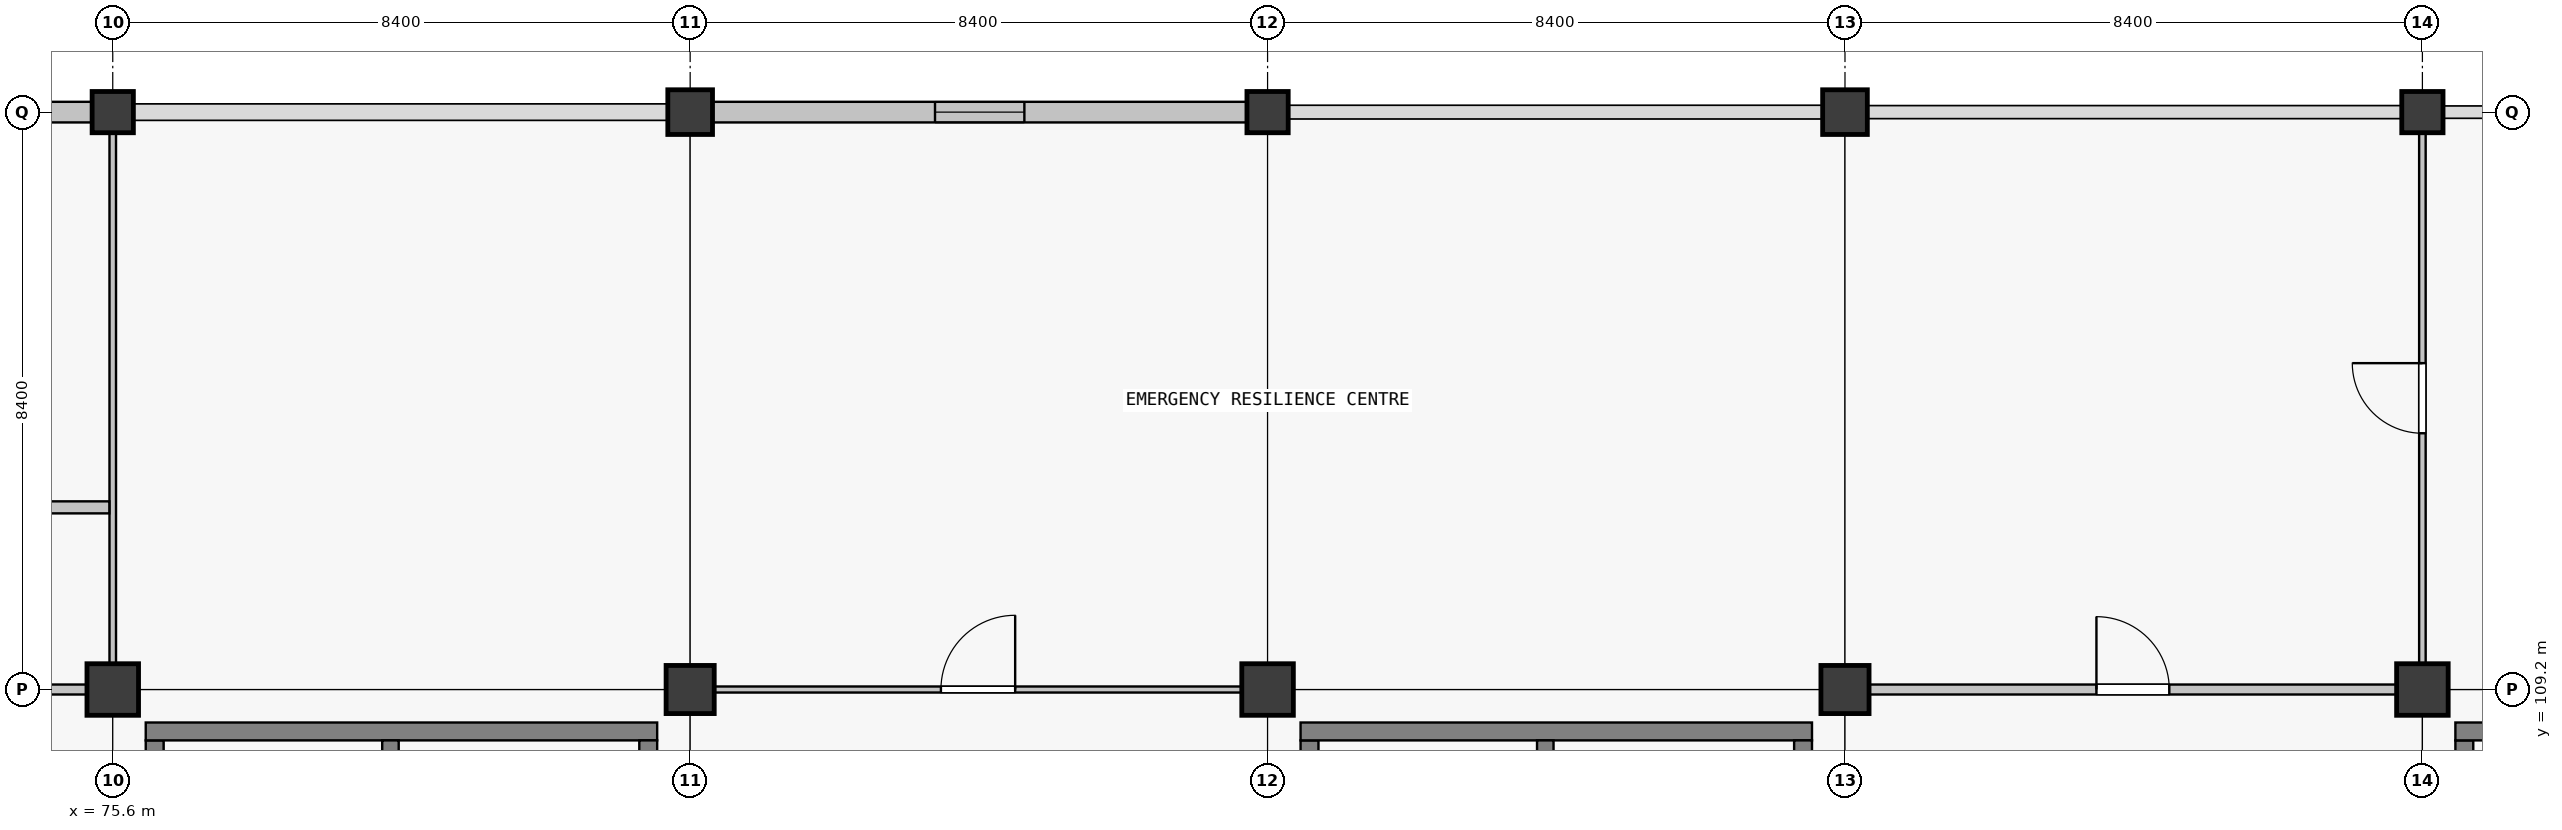
"""IFC4 building model, lengths in metres.
Left out: names, types, materials, properties, quantities, classifications, styles, units other than length and angle.
Written with IfcOpenShell. Run it as: python <this file> out.ifc"""

import sys

from ifc_helpers import new_model, si_unit, direction, frame, frame_2d, origin, origin_2d, place, context, subcontext, project, spatial, rectangle, extrude, element, fill, save


model = new_model("IFC4")
c1 = context("Model", 3, precision=1e-05, world=origin(), true_north=direction((0.0, 1.0)))
c2 = subcontext(c1, "Body", "Model", "MODEL_VIEW")
j1 = project(units=[si_unit("LENGTHUNIT", "METRE"), si_unit("PLANEANGLEUNIT", "RADIAN")], contexts=[c1])
p1 = place(None, origin())
s1 = spatial("IfcSite", under=j1, at=p1, CompositionType="ELEMENT")
p2 = place(p1, origin())
s2 = spatial("IfcBuilding", under=s1, at=p2, CompositionType="ELEMENT")
p3 = place(p2, frame((0.0, 0.0, 19.08)))
s3 = spatial("IfcBuildingStorey", under=s2, at=p3, CompositionType="ELEMENT", Elevation=19.08)
p4 = place(p3, frame((75.6, 109.2, 0.0), z_axis=(0.0, 0.0, 1.0), x_axis=(1.0, 0.0, 0.0)))
e1 = element("IfcColumn", 1, at=p4, inside=s3, PredefinedType="COLUMN", context=c2, shape_type="SweptSolid", body=[
    extrude(rectangle(XDim=0.75, YDim=0.75, at=origin_2d()), origin(), (0.0, 0.0, 1.0), 4.32),
])
p5 = place(p3, frame((75.6, 117.6, 0.0), z_axis=(0.0, 0.0, 1.0), x_axis=(1.0, 0.0, 0.0)))
e2 = element("IfcColumn", 2, at=p5, inside=s3, PredefinedType="COLUMN", context=c2, shape_type="SweptSolid", body=[
    extrude(rectangle(XDim=0.6, YDim=0.6, at=origin_2d()), origin(), (0.0, 0.0, 1.0), 4.32),
])
p6 = place(p3, frame((84.0, 109.2, 0.0), z_axis=(0.0, 0.0, 1.0), x_axis=(1.0, 0.0, 0.0)))
e3 = element("IfcColumn", 3, at=p6, inside=s3, PredefinedType="COLUMN", context=c2, shape_type="SweptSolid", body=[
    extrude(rectangle(XDim=0.7, YDim=0.7, at=origin_2d()), origin(), (0.0, 0.0, 1.0), 4.32),
])
p7 = place(p3, frame((84.0, 117.6, 0.0), z_axis=(0.0, 0.0, 1.0), x_axis=(1.0, 0.0, 0.0)))
e4 = element("IfcColumn", 4, at=p7, inside=s3, PredefinedType="COLUMN", context=c2, shape_type="SweptSolid", body=[
    extrude(rectangle(XDim=0.65, YDim=0.65, at=origin_2d()), origin(), (0.0, 0.0, 1.0), 4.32),
])
p8 = place(p3, frame((92.4, 109.2, 0.0), z_axis=(0.0, 0.0, 1.0), x_axis=(1.0, 0.0, 0.0)))
e5 = element("IfcColumn", 5, at=p8, inside=s3, PredefinedType="COLUMN", context=c2, shape_type="SweptSolid", body=[
    extrude(rectangle(XDim=0.75, YDim=0.75, at=origin_2d()), origin(), (0.0, 0.0, 1.0), 4.32),
])
p9 = place(p3, frame((92.4, 117.6, 0.0), z_axis=(0.0, 0.0, 1.0), x_axis=(1.0, 0.0, 0.0)))
e6 = element("IfcColumn", 6, at=p9, inside=s3, PredefinedType="COLUMN", context=c2, shape_type="SweptSolid", body=[
    extrude(rectangle(XDim=0.6, YDim=0.6, at=origin_2d()), origin(), (0.0, 0.0, 1.0), 4.32),
])
p10 = place(p3, frame((100.8, 109.2, 0.0), z_axis=(0.0, 0.0, 1.0), x_axis=(1.0, 0.0, 0.0)))
e7 = element("IfcColumn", 7, at=p10, inside=s3, PredefinedType="COLUMN", context=c2, shape_type="SweptSolid", body=[
    extrude(rectangle(XDim=0.7, YDim=0.7, at=origin_2d()), origin(), (0.0, 0.0, 1.0), 4.32),
])
p11 = place(p3, frame((100.8, 117.6, 0.0), z_axis=(0.0, 0.0, 1.0), x_axis=(1.0, 0.0, 0.0)))
e8 = element("IfcColumn", 8, at=p11, inside=s3, PredefinedType="COLUMN", context=c2, shape_type="SweptSolid", body=[
    extrude(rectangle(XDim=0.65, YDim=0.65, at=origin_2d()), origin(), (0.0, 0.0, 1.0), 4.32),
])
p12 = place(p3, frame((109.2, 109.2, 0.0), z_axis=(0.0, 0.0, 1.0), x_axis=(1.0, 0.0, 0.0)))
e9 = element("IfcColumn", 9, at=p12, inside=s3, PredefinedType="COLUMN", context=c2, shape_type="SweptSolid", body=[
    extrude(rectangle(XDim=0.75, YDim=0.75, at=origin_2d()), origin(), (0.0, 0.0, 1.0), 4.32),
])
p13 = place(p3, frame((109.2, 117.6, 0.0), z_axis=(0.0, 0.0, 1.0), x_axis=(1.0, 0.0, 0.0)))
e10 = element("IfcColumn", 10, at=p13, inside=s3, PredefinedType="COLUMN", context=c2, shape_type="SweptSolid", body=[
    extrude(rectangle(XDim=0.6, YDim=0.6, at=origin_2d()), origin(), (0.0, 0.0, 1.0), 4.32),
])
p14 = place(p3, frame((67.526, 117.6, 0.0), z_axis=(0.0, 0.0, 1.0), x_axis=(1.0, 0.0, 0.0)))
e11 = element("IfcWall", 11, at=p14, inside=s3, PredefinedType="SOLIDWALL", context=c2, shape_type="SweptSolid", body=[
    extrude(rectangle(XDim=7.773, YDim=0.3, at=frame_2d((3.887, 0.0))), origin(), (0.0, 0.0, 1.0), 3.37),
])
p15 = place(p14, frame((2.811, 0.0, 0.9)))
e12 = element("IfcOpeningElement", 12, at=p15, cuts=e11, PredefinedType="OPENING", context=c2, shape_type="SweptSolid", body=[
    extrude(rectangle(XDim=2.15, YDim=1.95, at=frame_2d((1.075, 0.975))), frame((0.0, 0.15, 0.0), z_axis=(0.0, -1.0, 0.0), x_axis=(1.0, 0.0, 0.0)), (0.0, 0.0, 1.0), 0.3),
])
p16 = place(p3, frame((84.326, 117.6, 0.0), z_axis=(0.0, 0.0, 1.0), x_axis=(1.0, 0.0, 0.0)))
e13 = element("IfcWall", 13, at=p16, inside=s3, PredefinedType="SOLIDWALL", context=c2, shape_type="SweptSolid", body=[
    extrude(rectangle(XDim=7.773, YDim=0.3, at=frame_2d((3.887, 0.0))), origin(), (0.0, 0.0, 1.0), 3.37),
])
p17 = place(p16, frame((3.236, 0.0, 0.9)))
e14 = element("IfcOpeningElement", 14, at=p17, cuts=e13, PredefinedType="OPENING", context=c2, shape_type="SweptSolid", body=[
    extrude(rectangle(XDim=1.3, YDim=1.95, at=frame_2d((0.65, 0.975))), frame((0.0, 0.15, 0.0), z_axis=(0.0, -1.0, 0.0), x_axis=(1.0, 0.0, 0.0)), (0.0, 0.0, 1.0), 0.3),
])
p18 = place(p3, frame((109.81, 101.54, 0.0), z_axis=(0.0, 0.0, 1.0), x_axis=(0.0, 1.0, 0.0)))
e15 = element("IfcWall", 15, at=p18, inside=s3, PredefinedType="SHEAR", context=c2, shape_type="SweptSolid", body=[
    extrude(rectangle(XDim=6.92, YDim=0.26, at=frame_2d((3.46, 0.0))), origin(), (0.0, 0.0, 1.0), 4.32),
])
p19 = place(p3, frame((109.68, 108.59, 0.0), z_axis=(0.0, 0.0, 1.0), x_axis=(1.0, 0.0, 0.0)))
e16 = element("IfcWall", 16, at=p19, inside=s3, PredefinedType="SHEAR", context=c2, shape_type="SweptSolid", body=[
    extrude(rectangle(XDim=7.44, YDim=0.26, at=frame_2d((3.72, 0.0))), origin(), (0.0, 0.0, 1.0), 4.32),
])
p20 = place(p3, frame((76.21, 101.54, 0.0), z_axis=(0.0, 0.0, 1.0), x_axis=(0.0, 1.0, 0.0)))
e17 = element("IfcWall", 17, at=p20, inside=s3, PredefinedType="SHEAR", context=c2, shape_type="SweptSolid", body=[
    extrude(rectangle(XDim=6.92, YDim=0.26, at=frame_2d((3.46, 0.0))), origin(), (0.0, 0.0, 1.0), 4.32),
])
p21 = place(p3, frame((76.08, 108.59, 0.0), z_axis=(0.0, 0.0, 1.0), x_axis=(1.0, 0.0, 0.0)))
e18 = element("IfcWall", 18, at=p21, inside=s3, PredefinedType="SHEAR", context=c2, shape_type="SweptSolid", body=[
    extrude(rectangle(XDim=7.44, YDim=0.26, at=frame_2d((3.72, 0.0))), origin(), (0.0, 0.0, 1.0), 4.32),
])
p22 = place(p3, frame((83.39, 108.46, 0.0), z_axis=(0.0, 0.0, 1.0), x_axis=(0.0, -1.0, 0.0)))
e19 = element("IfcWall", 19, at=p22, inside=s3, PredefinedType="SHEAR", context=c2, shape_type="SweptSolid", body=[
    extrude(rectangle(XDim=6.92, YDim=0.26, at=frame_2d((3.46, 0.0))), origin(), (0.0, 0.0, 1.0), 4.32),
])
p23 = place(p22, frame((4.01, 0.0, 0.0)))
e20 = element("IfcOpeningElement", 20, at=p23, cuts=e19, PredefinedType="OPENING", context=c2, shape_type="SweptSolid", body=[
    extrude(rectangle(XDim=1.5, YDim=2.15, at=frame_2d((0.75, 1.075))), frame((0.0, 0.13, 0.0), z_axis=(0.0, -1.0, 0.0), x_axis=(1.0, 0.0, 0.0)), (0.0, 0.0, 1.0), 0.26),
])
p24 = place(p3, frame((79.64, 101.54, 0.0), z_axis=(0.0, 0.0, 1.0), x_axis=(0.0, 1.0, 0.0)))
e21 = element("IfcWall", 21, at=p24, inside=s3, PredefinedType="SHEAR", context=c2, shape_type="SweptSolid", body=[
    extrude(rectangle(XDim=6.92, YDim=0.24, at=frame_2d((3.46, 0.0))), origin(), (0.0, 0.0, 1.0), 4.32),
])
p25 = place(p24, frame((0.12, 0.0, 0.0)))
e22 = element("IfcOpeningElement", 22, at=p25, cuts=e21, PredefinedType="OPENING", context=c2, shape_type="SweptSolid", body=[
    extrude(rectangle(XDim=1.0, YDim=2.15, at=frame_2d((0.5, 1.075))), frame((0.0, 0.12, 0.0), z_axis=(0.0, -1.0, 0.0), x_axis=(1.0, 0.0, 0.0)), (0.0, 0.0, 1.0), 0.24),
])
p26 = place(p3, frame((93.01, 101.54, 0.0), z_axis=(0.0, 0.0, 1.0), x_axis=(0.0, 1.0, 0.0)))
e23 = element("IfcWall", 23, at=p26, inside=s3, PredefinedType="SHEAR", context=c2, shape_type="SweptSolid", body=[
    extrude(rectangle(XDim=6.92, YDim=0.26, at=frame_2d((3.46, 0.0))), origin(), (0.0, 0.0, 1.0), 4.32),
])
p27 = place(p3, frame((92.88, 108.59, 0.0), z_axis=(0.0, 0.0, 1.0), x_axis=(1.0, 0.0, 0.0)))
e24 = element("IfcWall", 24, at=p27, inside=s3, PredefinedType="SHEAR", context=c2, shape_type="SweptSolid", body=[
    extrude(rectangle(XDim=7.44, YDim=0.26, at=frame_2d((3.72, 0.0))), origin(), (0.0, 0.0, 1.0), 4.32),
])
p28 = place(p3, frame((100.19, 108.46, 0.0), z_axis=(0.0, 0.0, 1.0), x_axis=(0.0, -1.0, 0.0)))
e25 = element("IfcWall", 25, at=p28, inside=s3, PredefinedType="SHEAR", context=c2, shape_type="SweptSolid", body=[
    extrude(rectangle(XDim=6.92, YDim=0.26, at=frame_2d((3.46, 0.0))), origin(), (0.0, 0.0, 1.0), 4.32),
])
p29 = place(p28, frame((4.01, 0.0, 0.0)))
e26 = element("IfcOpeningElement", 26, at=p29, cuts=e25, PredefinedType="OPENING", context=c2, shape_type="SweptSolid", body=[
    extrude(rectangle(XDim=1.5, YDim=2.15, at=frame_2d((0.75, 1.075))), frame((0.0, 0.13, 0.0), z_axis=(0.0, -1.0, 0.0), x_axis=(1.0, 0.0, 0.0)), (0.0, 0.0, 1.0), 0.26),
])
p30 = place(p3, frame((96.44, 101.54, 0.0), z_axis=(0.0, 0.0, 1.0), x_axis=(0.0, 1.0, 0.0)))
e27 = element("IfcWall", 27, at=p30, inside=s3, PredefinedType="SHEAR", context=c2, shape_type="SweptSolid", body=[
    extrude(rectangle(XDim=6.92, YDim=0.24, at=frame_2d((3.46, 0.0))), origin(), (0.0, 0.0, 1.0), 4.32),
])
p31 = place(p30, frame((0.12, 0.0, 0.0)))
e28 = element("IfcOpeningElement", 28, at=p31, cuts=e27, PredefinedType="OPENING", context=c2, shape_type="SweptSolid", body=[
    extrude(rectangle(XDim=1.0, YDim=2.15, at=frame_2d((0.5, 1.075))), frame((0.0, 0.12, 0.0), z_axis=(0.0, -1.0, 0.0), x_axis=(1.0, 0.0, 0.0)), (0.0, 0.0, 1.0), 0.24),
])
p32 = place(p3, frame((67.552, 109.2, 0.0), z_axis=(0.0, 0.0, 1.0), x_axis=(1.0, 0.0, 0.0)))
e29 = element("IfcWall", 29, at=p32, inside=s3, PredefinedType="PARTITIONING", context=c2, shape_type="SweptSolid", body=[
    extrude(rectangle(XDim=7.671, YDim=0.145, at=frame_2d((3.835, 0.0))), origin(), (0.0, 0.0, 1.0), 3.19),
])
p33 = place(p3, frame((84.352, 109.2, 0.0), z_axis=(0.0, 0.0, 1.0), x_axis=(1.0, 0.0, 0.0)))
e30 = element("IfcWall", 30, at=p33, inside=s3, PredefinedType="PARTITIONING", context=c2, shape_type="SweptSolid", body=[
    extrude(rectangle(XDim=7.671, YDim=0.088, at=frame_2d((3.835, 0.0))), origin(), (0.0, 0.0, 1.0), 3.19),
])
p34 = place(p33, frame((3.296, 0.0, 0.0)))
e31 = element("IfcOpeningElement", 31, at=p34, cuts=e30, PredefinedType="OPENING", context=c2, shape_type="SweptSolid", body=[
    extrude(rectangle(XDim=1.08, YDim=2.25, at=frame_2d((0.54, 1.125))), frame((0.0, 0.044, 0.0), z_axis=(0.0, -1.0, 0.0), x_axis=(1.0, 0.0, 0.0)), (0.0, 0.0, 1.0), 0.088),
])
p35 = place(p3, frame((101.152, 109.2, 0.0), z_axis=(0.0, 0.0, 1.0), x_axis=(1.0, 0.0, 0.0)))
e32 = element("IfcWall", 32, at=p35, inside=s3, PredefinedType="PARTITIONING", context=c2, shape_type="SweptSolid", body=[
    extrude(rectangle(XDim=7.671, YDim=0.145, at=frame_2d((3.835, 0.0))), origin(), (0.0, 0.0, 1.0), 3.19),
])
p36 = place(p35, frame((3.306, 0.0, 0.0)))
e33 = element("IfcOpeningElement", 33, at=p36, cuts=e32, PredefinedType="OPENING", context=c2, shape_type="SweptSolid", body=[
    extrude(rectangle(XDim=1.06, YDim=2.25, at=frame_2d((0.53, 1.125))), frame((0.0, 0.073, 0.0), z_axis=(0.0, -1.0, 0.0), x_axis=(1.0, 0.0, 0.0)), (0.0, 0.0, 1.0), 0.145),
])
p37 = place(p3, frame((75.6, 109.577, 0.0), z_axis=(0.0, 0.0, 1.0), x_axis=(0.0, 1.0, 0.0)))
e34 = element("IfcWall", 34, at=p37, inside=s3, PredefinedType="PARTITIONING", context=c2, shape_type="SweptSolid", body=[
    extrude(rectangle(XDim=7.721, YDim=0.095, at=frame_2d((3.861, 0.0))), origin(), (0.0, 0.0, 1.0), 3.19),
])
p38 = place(p3, frame((109.2, 109.577, 0.0), z_axis=(0.0, 0.0, 1.0), x_axis=(0.0, 1.0, 0.0)))
e35 = element("IfcWall", 35, at=p38, inside=s3, PredefinedType="PARTITIONING", context=c2, shape_type="SweptSolid", body=[
    extrude(rectangle(XDim=7.721, YDim=0.095, at=frame_2d((3.861, 0.0))), origin(), (0.0, 0.0, 1.0), 3.19),
])
p39 = place(p38, frame((3.351, 0.0, 0.0)))
e36 = element("IfcOpeningElement", 36, at=p39, cuts=e35, PredefinedType="OPENING", context=c2, shape_type="SweptSolid", body=[
    extrude(rectangle(XDim=1.02, YDim=2.2, at=frame_2d((0.51, 1.1))), frame((0.0, 0.047, 0.0), z_axis=(0.0, -1.0, 0.0), x_axis=(1.0, 0.0, 0.0)), (0.0, 0.0, 1.0), 0.095),
])
p40 = place(p3, frame((67.264, 111.85, 0.0), z_axis=(0.0, 0.0, 1.0), x_axis=(1.0, 0.0, 0.0)))
e37 = element("IfcWall", 37, at=p40, inside=s3, PredefinedType="PARTITIONING", context=c2, shape_type="SweptSolid", body=[
    extrude(rectangle(XDim=8.286, YDim=0.175, at=frame_2d((4.143, 0.0))), origin(), (0.0, 0.0, 1.0), 3.19),
])
p41 = place(p17, origin())
e38 = element("IfcWindow", 38, at=p41, inside=s3, PartitioningType="SINGLE_PANEL", PredefinedType="WINDOW", context=c2, shape_type="SweptSolid", body=[
    extrude(rectangle(XDim=1.3, YDim=1.95, at=frame_2d((0.65, 0.975))), frame((0.0, 0.03, 0.0), z_axis=(0.0, -1.0, 0.0), x_axis=(1.0, 0.0, 0.0)), (0.0, 0.0, 1.0), 0.06),
])
fill(e14, e38)
p42 = place(p34, origin())
e39 = element("IfcDoor", 39, at=p42, inside=s3, OperationType="SINGLE_SWING_RIGHT", PredefinedType="DOOR", context=c2, shape_type="SweptSolid", body=[
    extrude(rectangle(XDim=1.08, YDim=2.25, at=frame_2d((0.54, 1.125))), frame((0.0, 0.025, 0.0), z_axis=(0.0, -1.0, 0.0), x_axis=(1.0, 0.0, 0.0)), (0.0, 0.0, 1.0), 0.05),
])
fill(e31, e39)
p43 = place(p36, origin())
e40 = element("IfcDoor", 40, at=p43, inside=s3, OperationType="SINGLE_SWING_LEFT", PredefinedType="DOOR", context=c2, shape_type="SweptSolid", body=[
    extrude(rectangle(XDim=1.06, YDim=2.25, at=frame_2d((0.53, 1.125))), frame((0.0, 0.025, 0.0), z_axis=(0.0, -1.0, 0.0), x_axis=(1.0, 0.0, 0.0)), (0.0, 0.0, 1.0), 0.05),
])
fill(e33, e40)
p44 = place(p39, origin())
e41 = element("IfcDoor", 41, at=p44, inside=s3, OperationType="SINGLE_SWING_RIGHT", PredefinedType="DOOR", context=c2, shape_type="SweptSolid", body=[
    extrude(rectangle(XDim=1.02, YDim=2.2, at=frame_2d((0.51, 1.1))), frame((0.0, 0.025, 0.0), z_axis=(0.0, -1.0, 0.0), x_axis=(1.0, 0.0, 0.0)), (0.0, 0.0, 1.0), 0.05),
])
fill(e36, e41)
save(model, sys.argv[1])
